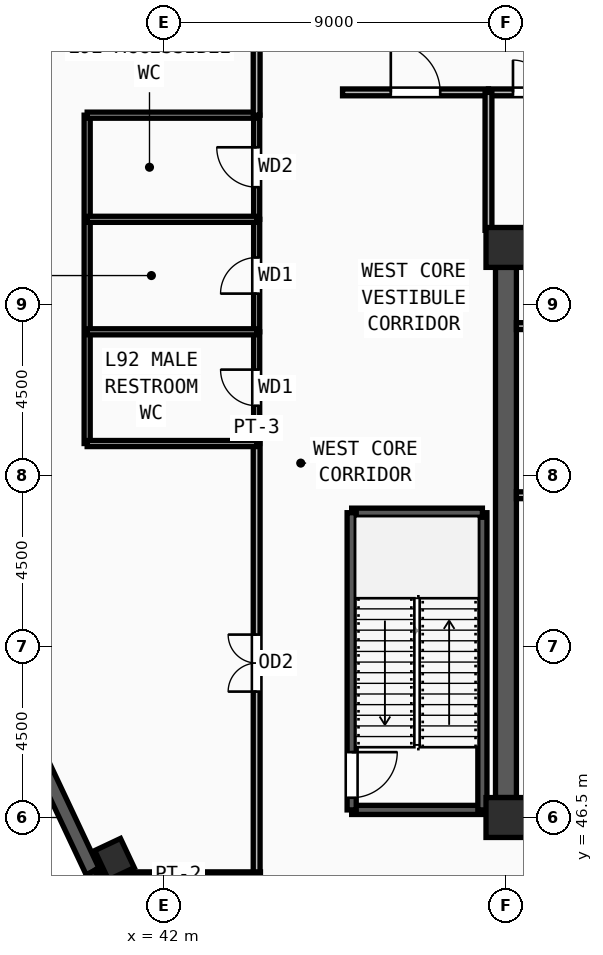
"""IFC4 building model, lengths in metres.
Left out: names, types, materials, properties, quantities, classifications, styles, units other than length and angle.
Written with IfcOpenShell. Run it as: python <this file> out.ifc"""

import sys

from ifc_helpers import new_model, si_unit, direction, frame, frame_2d, origin, origin_2d, place, context, subcontext, project, spatial, rectangle, extrude, source, transform, mapped, element, fill, save


model = new_model("IFC4")
c1 = context("Model", 3, precision=1e-05, world=origin(), true_north=direction((0.0, 1.0)))
c2 = subcontext(c1, "Body", "Model", "MODEL_VIEW")
j1 = project(units=[si_unit("LENGTHUNIT", "METRE"), si_unit("PLANEANGLEUNIT", "RADIAN")], contexts=[c1])
p1 = place(None, origin())
s1 = spatial("IfcSite", under=j1, at=p1, CompositionType="ELEMENT")
p2 = place(p1, origin())
s2 = spatial("IfcBuilding", under=s1, at=p2, CompositionType="ELEMENT")
p3 = place(p2, frame((0.0, 0.0, 355.8)))
s3 = spatial("IfcBuildingStorey", under=s2, at=p3, CompositionType="ELEMENT", Elevation=355.8)
m1 = source(origin(), c2, "Body", "SweptSolid", [
    extrude(rectangle(XDim=1.05, YDim=1.05, at=origin_2d()), origin(), (0.0, 0.0, 1.0), 4.8),
])
for number, where, z_axis, x_axis in (
    (1, (51.0, 46.5, 0.0), (0.0, 0.0, 1.0), (1.0, 0.0, 0.0)),
    (2, (51.0, 61.5, 0.0), (0.0, 0.0, 1.0), (1.0, 0.0, 0.0)),
):
    element("IfcColumn", number, at=place(p3, frame(where, z_axis=z_axis, x_axis=x_axis)), inside=s3, PredefinedType="COLUMN", context=c2, shape_type="MappedRepresentation", body=[
        mapped(m1, transform((0.0, 0.0, 0.0), x_axis=(1.0, 0.0, 0.0), y_axis=(0.0, 1.0, 0.0), z_axis=(0.0, 0.0, 1.0), scale=1.0)),
    ])
m2 = source(origin(), c2, "Body", "SweptSolid", [
    extrude(rectangle(XDim=0.85, YDim=0.75, at=origin_2d()), origin(), (0.0, 0.0, 1.0), 4.8),
])
p4 = place(p3, frame((40.699, 45.405, 0.0), z_axis=(0.0, 0.0, 1.0), x_axis=(-0.425937207192, 0.90475272618, 0.0)))
e3 = element("IfcColumn", 3, at=p4, inside=s3, PredefinedType="COLUMN", context=c2, shape_type="MappedRepresentation", body=[
    mapped(m2, transform((0.0, 0.0, 0.0), x_axis=(1.0, 0.0, 0.0), y_axis=(0.0, 1.0, 0.0), z_axis=(0.0, 0.0, 1.0), scale=1.0)),
])
p5 = place(p3, frame((30.621, 65.258, 0.0), z_axis=(0.0, 0.0, 1.0), x_axis=(0.426031057179, -0.904708537773, 0.0)))
e4 = element("IfcWall", 4, at=p5, inside=s3, PredefinedType="SOLIDWALL", context=c2, shape_type="SweptSolid", body=[
    extrude(rectangle(XDim=22.306, YDim=0.38, at=frame_2d((11.153, 0.0))), origin(), (0.0, 0.0, 1.0), 4.35),
])
m3 = source(origin(), c2, "Body", "SweptSolid", [
    extrude(rectangle(XDim=1.35, YDim=1.85, at=frame_2d((0.675, 0.925))), frame((0.0, 0.2, 0.0), z_axis=(0.0, -1.0, 0.0), x_axis=(1.0, 0.0, 0.0)), (0.0, 0.0, 1.0), 0.4),
])
p6 = place(p5, frame((10.478, 0.0, 0.55)))
e5 = element("IfcOpeningElement", 5, at=p6, cuts=e4, PredefinedType="OPENING", context=c2, shape_type="MappedRepresentation", body=[
    mapped(m3, transform((0.0, 0.0, 0.0), x_axis=(1.0, 0.0, 0.0), y_axis=(0.0, 1.0, 0.0), z_axis=(0.0, 0.0, 1.0), scale=1.0)),
])
p7 = place(p3, frame((40.124, 45.078, 0.0), z_axis=(0.0, 0.0, 1.0), x_axis=(0.559113952573, -0.829090820138, 0.0)))
e6 = element("IfcWall", 6, at=p7, inside=s3, PredefinedType="SOLIDWALL", context=c2, shape_type="SweptSolid", body=[
    extrude(rectangle(XDim=8.308, YDim=0.38, at=frame_2d((4.154, 0.0))), origin(), (0.0, 0.0, 1.0), 4.35),
])
p8 = place(p7, frame((3.479, 0.0, 0.55)))
e7 = element("IfcOpeningElement", 7, at=p8, cuts=e6, PredefinedType="OPENING", context=c2, shape_type="MappedRepresentation", body=[
    mapped(m3, transform((0.0, 0.0, 0.0), x_axis=(1.0, 0.0, 0.0), y_axis=(0.0, 1.0, 0.0), z_axis=(0.0, 0.0, 1.0), scale=1.0)),
])
p9 = place(p3, frame((51.0, 47.025, 0.0), z_axis=(0.0, 0.0, 1.0), x_axis=(0.0, 1.0, 0.0)))
e8 = element("IfcWall", 8, at=p9, inside=s3, PredefinedType="SHEAR", context=c2, shape_type="SweptSolid", body=[
    extrude(rectangle(XDim=13.95, YDim=0.55, at=frame_2d((6.975, 0.0))), origin(), (0.0, 0.0, 1.0), 4.35),
])
p10 = place(p3, frame((46.94, 46.7, 0.0), z_axis=(0.0, 0.0, 1.0), x_axis=(1.0, 0.0, 0.0)))
e9 = element("IfcWall", 9, at=p10, inside=s3, PredefinedType="SOLIDWALL", context=c2, shape_type="SweptSolid", body=[
    extrude(rectangle(XDim=3.44, YDim=0.24, at=frame_2d((1.72, 0.0))), origin(), (0.0, 0.0, 1.0), 4.35),
])
p11 = place(p3, frame((50.38, 46.7, 0.0), z_axis=(0.0, 0.0, 1.0), x_axis=(0.0, 1.0, 0.0)))
e10 = element("IfcWall", 10, at=p11, inside=s3, PredefinedType="SOLIDWALL", context=c2, shape_type="SweptSolid", body=[
    extrude(rectangle(XDim=7.82, YDim=0.24, at=frame_2d((3.91, 0.0))), origin(), (0.0, 0.0, 1.0), 4.35),
])
p12 = place(p3, frame((50.38, 54.52, 0.0), z_axis=(0.0, 0.0, 1.0), x_axis=(-1.0, 0.0, 0.0)))
e11 = element("IfcWall", 11, at=p12, inside=s3, PredefinedType="SOLIDWALL", context=c2, shape_type="SweptSolid", body=[
    extrude(rectangle(XDim=3.44, YDim=0.24, at=frame_2d((1.72, 0.0))), origin(), (0.0, 0.0, 1.0), 4.35),
])
p13 = place(p3, frame((46.94, 54.52, 0.0), z_axis=(0.0, 0.0, 1.0), x_axis=(0.0, -1.0, 0.0)))
e12 = element("IfcWall", 12, at=p13, inside=s3, PredefinedType="SOLIDWALL", context=c2, shape_type="SweptSolid", body=[
    extrude(rectangle(XDim=7.82, YDim=0.24, at=frame_2d((3.91, 0.0))), origin(), (0.0, 0.0, 1.0), 4.35),
])
m4 = source(origin(), c2, "Body", "SweptSolid", [
    extrude(rectangle(XDim=1.2, YDim=2.2, at=frame_2d((0.6, 1.1))), frame((0.0, 0.13, 0.0), z_axis=(0.0, -1.0, 0.0), x_axis=(1.0, 0.0, 0.0)), (0.0, 0.0, 1.0), 0.26),
])
p14 = place(p13, frame((6.3, 0.0, 0.0)))
e13 = element("IfcOpeningElement", 13, at=p14, cuts=e12, PredefinedType="OPENING", context=c2, shape_type="MappedRepresentation", body=[
    mapped(m4, transform((0.0, 0.0, 0.0), x_axis=(1.0, 0.0, 0.0), y_axis=(0.0, 1.0, 0.0), z_axis=(0.0, 0.0, 1.0), scale=1.0)),
])
p15 = place(p3, frame((51.275, 54.98, 0.0), z_axis=(0.0, 0.0, 1.0), x_axis=(1.0, 0.0, 0.0)))
e14 = element("IfcWall", 14, at=p15, inside=s3, PredefinedType="PARTITIONING", context=c2, shape_type="SweptSolid", body=[
    extrude(rectangle(XDim=2.485, YDim=0.18, at=frame_2d((1.243, 0.0))), origin(), (0.0, 0.0, 1.0), 4.35),
])
m5 = source(origin(), c2, "Body", "SweptSolid", [
    extrude(rectangle(XDim=0.85, YDim=2.1, at=frame_2d((0.425, 1.05))), frame((0.0, 0.1, 0.0), z_axis=(0.0, -1.0, 0.0), x_axis=(1.0, 0.0, 0.0)), (0.0, 0.0, 1.0), 0.2),
])
p16 = place(p15, frame((0.915, 0.0, 0.0)))
e15 = element("IfcOpeningElement", 15, at=p16, cuts=e14, PredefinedType="OPENING", context=c2, shape_type="MappedRepresentation", body=[
    mapped(m5, transform((0.0, 0.0, 0.0), x_axis=(1.0, 0.0, 0.0), y_axis=(0.0, 1.0, 0.0), z_axis=(0.0, 0.0, 1.0), scale=1.0)),
])
p17 = place(p3, frame((44.44, 56.34, 0.0), z_axis=(0.0, 0.0, 1.0), x_axis=(0.0, 1.0, 0.0)))
e16 = element("IfcWall", 16, at=p17, inside=s3, PredefinedType="PARTITIONING", context=c2, shape_type="SweptSolid", body=[
    extrude(rectangle(XDim=2.94, YDim=0.16, at=frame_2d((1.47, 0.0))), origin(), (0.0, 0.0, 1.0), 4.35),
])
m6 = source(origin(), c2, "Body", "SweptSolid", [
    extrude(rectangle(XDim=0.95, YDim=2.15, at=frame_2d((0.475, 1.075))), frame((0.0, 0.09, 0.0), z_axis=(0.0, -1.0, 0.0), x_axis=(1.0, 0.0, 0.0)), (0.0, 0.0, 1.0), 0.18),
])
p18 = place(p17, frame((0.995, 0.0, 0.0)))
e17 = element("IfcOpeningElement", 17, at=p18, cuts=e16, PredefinedType="OPENING", context=c2, shape_type="MappedRepresentation", body=[
    mapped(m6, transform((0.0, 0.0, 0.0), x_axis=(1.0, 0.0, 0.0), y_axis=(0.0, 1.0, 0.0), z_axis=(0.0, 0.0, 1.0), scale=1.0)),
])
p19 = place(p3, frame((44.44, 59.28, 0.0), z_axis=(0.0, 0.0, 1.0), x_axis=(0.0, 1.0, 0.0)))
e18 = element("IfcWall", 18, at=p19, inside=s3, PredefinedType="PARTITIONING", context=c2, shape_type="SweptSolid", body=[
    extrude(rectangle(XDim=2.96, YDim=0.16, at=frame_2d((1.48, 0.0))), origin(), (0.0, 0.0, 1.0), 4.35),
])
p20 = place(p19, frame((1.005, 0.0, 0.0)))
e19 = element("IfcOpeningElement", 19, at=p20, cuts=e18, PredefinedType="OPENING", context=c2, shape_type="MappedRepresentation", body=[
    mapped(m6, transform((0.0, 0.0, 0.0), x_axis=(1.0, 0.0, 0.0), y_axis=(0.0, 1.0, 0.0), z_axis=(0.0, 0.0, 1.0), scale=1.0)),
])
p21 = place(p3, frame((44.44, 62.24, 0.0), z_axis=(0.0, 0.0, 1.0), x_axis=(0.0, 1.0, 0.0)))
e20 = element("IfcWall", 20, at=p21, inside=s3, PredefinedType="PARTITIONING", context=c2, shape_type="SweptSolid", body=[
    extrude(rectangle(XDim=2.74, YDim=0.16, at=frame_2d((1.37, 0.0))), origin(), (0.0, 0.0, 1.0), 4.35),
])
m7 = source(origin(), c2, "Body", "SweptSolid", [
    extrude(rectangle(XDim=1.05, YDim=2.15, at=frame_2d((0.525, 1.075))), frame((0.0, 0.09, 0.0), z_axis=(0.0, -1.0, 0.0), x_axis=(1.0, 0.0, 0.0)), (0.0, 0.0, 1.0), 0.18),
])
p22 = place(p21, frame((0.845, 0.0, 0.0)))
e21 = element("IfcOpeningElement", 21, at=p22, cuts=e20, PredefinedType="OPENING", context=c2, shape_type="MappedRepresentation", body=[
    mapped(m7, transform((0.0, 0.0, 0.0), x_axis=(1.0, 0.0, 0.0), y_axis=(0.0, 1.0, 0.0), z_axis=(0.0, 0.0, 1.0), scale=1.0)),
])
p23 = place(p3, frame((50.54, 65.58, 0.0), z_axis=(0.0, 0.0, 1.0), x_axis=(1.0, 0.0, 0.0)))
e22 = element("IfcWall", 22, at=p23, inside=s3, PredefinedType="PARTITIONING", context=c2, shape_type="SweptSolid", body=[
    extrude(rectangle(XDim=2.14, YDim=0.18, at=frame_2d((1.07, 0.0))), origin(), (0.0, 0.0, 1.0), 4.35),
])
p24 = place(p23, frame((0.645, 0.0, 0.0)))
e23 = element("IfcOpeningElement", 23, at=p24, cuts=e22, PredefinedType="OPENING", context=c2, shape_type="MappedRepresentation", body=[
    mapped(m5, transform((0.0, 0.0, 0.0), x_axis=(1.0, 0.0, 0.0), y_axis=(0.0, 1.0, 0.0), z_axis=(0.0, 0.0, 1.0), scale=1.0)),
])
p25 = place(p3, frame((46.7, 65.58, 0.0), z_axis=(0.0, 0.0, 1.0), x_axis=(1.0, 0.0, 0.0)))
e24 = element("IfcWall", 24, at=p25, inside=s3, PredefinedType="PARTITIONING", context=c2, shape_type="SweptSolid", body=[
    extrude(rectangle(XDim=3.84, YDim=0.18, at=frame_2d((1.92, 0.0))), origin(), (0.0, 0.0, 1.0), 4.35),
])
m8 = source(origin(), c2, "Body", "SweptSolid", [
    extrude(rectangle(XDim=1.3, YDim=2.2, at=frame_2d((0.65, 1.1))), frame((0.0, 0.1, 0.0), z_axis=(0.0, -1.0, 0.0), x_axis=(1.0, 0.0, 0.0)), (0.0, 0.0, 1.0), 0.2),
])
p26 = place(p25, frame((1.27, 0.0, 0.0)))
e25 = element("IfcOpeningElement", 25, at=p26, cuts=e24, PredefinedType="OPENING", context=c2, shape_type="MappedRepresentation", body=[
    mapped(m8, transform((0.0, 0.0, 0.0), x_axis=(1.0, 0.0, 0.0), y_axis=(0.0, 1.0, 0.0), z_axis=(0.0, 0.0, 1.0), scale=1.0)),
])
p27 = place(p3, frame((44.44, 44.785, 0.0), z_axis=(0.0, 0.0, 1.0), x_axis=(0.0, 1.0, 0.0)))
e26 = element("IfcWall", 26, at=p27, inside=s3, PredefinedType="PARTITIONING", context=c2, shape_type="SweptSolid", body=[
    extrude(rectangle(XDim=11.555, YDim=0.18, at=frame_2d((5.778, 0.0))), origin(), (0.0, 0.0, 1.0), 3.985),
])
m9 = source(origin(), c2, "Body", "SweptSolid", [
    extrude(rectangle(XDim=1.5, YDim=2.2, at=frame_2d((0.75, 1.1))), frame((0.0, 0.1, 0.0), z_axis=(0.0, -1.0, 0.0), x_axis=(1.0, 0.0, 0.0)), (0.0, 0.0, 1.0), 0.2),
])
p28 = place(p27, frame((5.028, 0.0, 0.0)))
e27 = element("IfcOpeningElement", 27, at=p28, cuts=e26, PredefinedType="OPENING", context=c2, shape_type="MappedRepresentation", body=[
    mapped(m9, transform((0.0, 0.0, 0.0), x_axis=(1.0, 0.0, 0.0), y_axis=(0.0, 1.0, 0.0), z_axis=(0.0, 0.0, 1.0), scale=1.0)),
])
p29 = place(p3, frame((51.275, 59.43, 0.0), z_axis=(0.0, 0.0, 1.0), x_axis=(1.0, 0.0, 0.0)))
e28 = element("IfcWall", 28, at=p29, inside=s3, PredefinedType="PARTITIONING", context=c2, shape_type="SweptSolid", body=[
    extrude(rectangle(XDim=2.505, YDim=0.18, at=frame_2d((1.252, 0.0))), origin(), (0.0, 0.0, 1.0), 4.35),
])
p30 = place(p3, frame((39.98, 56.34, 0.0), z_axis=(0.0, 0.0, 1.0), x_axis=(0.0, 1.0, 0.0)))
e29 = element("IfcWall", 29, at=p30, inside=s3, PredefinedType="PARTITIONING", context=c2, shape_type="SweptSolid", body=[
    extrude(rectangle(XDim=8.64, YDim=0.16, at=frame_2d((4.32, 0.0))), origin(), (0.0, 0.0, 1.0), 4.35),
])
for number, where, z_axis, x_axis in (
    (30, (39.98, 56.34, 0.0), (0.0, 0.0, 1.0), (1.0, 0.0, 0.0)),
    (31, (39.98, 59.28, 0.0), (0.0, 0.0, 1.0), (1.0, 0.0, 0.0)),
    (32, (39.98, 62.24, 0.0), (0.0, 0.0, 1.0), (1.0, 0.0, 0.0)),
    (33, (39.98, 64.98, 0.0), (0.0, 0.0, 1.0), (1.0, 0.0, 0.0)),
):
    element("IfcWall", number, at=place(p3, frame(where, z_axis=z_axis, x_axis=x_axis)), inside=s3, PredefinedType="PARTITIONING", context=c2, shape_type="SweptSolid", body=[
        extrude(rectangle(XDim=4.46, YDim=0.16, at=frame_2d((2.23, 0.0))), origin(), (0.0, 0.0, 1.0), 4.35),
    ])
p31 = place(p3, frame((50.54, 61.95, 0.0), z_axis=(0.0, 0.0, 1.0), x_axis=(0.0, 1.0, 0.0)))
e34 = element("IfcWall", 34, at=p31, inside=s3, PredefinedType="PARTITIONING", context=c2, shape_type="SweptSolid", body=[
    extrude(rectangle(XDim=3.63, YDim=0.18, at=frame_2d((1.815, 0.0))), origin(), (0.0, 0.0, 1.0), 4.35),
])
p32 = place(p3, frame((44.44, 64.98, 0.0), z_axis=(0.0, 0.0, 1.0), x_axis=(0.0, 1.0, 0.0)))
e35 = element("IfcWall", 35, at=p32, inside=s3, PredefinedType="PARTITIONING", context=c2, shape_type="SweptSolid", body=[
    extrude(rectangle(XDim=3.0, YDim=0.18, at=frame_2d((1.5, 0.0))), origin(), (0.0, 0.0, 1.0), 4.35),
])
p33 = place(p3, frame((44.54, 45.0, 0.0), z_axis=(0.0, 0.0, 1.0), x_axis=(-1.0, 0.0, 0.0)))
e36 = element("IfcWall", 36, at=p33, inside=s3, PredefinedType="PARTITIONING", context=c2, shape_type="SweptSolid", body=[
    extrude(rectangle(XDim=4.327, YDim=0.14, at=frame_2d((2.164, 0.0))), origin(), (0.0, 0.0, 1.0), 4.35),
])
m10 = source(origin(), c2, "Body", "SweptSolid", [
    extrude(rectangle(XDim=1.2, YDim=2.2, at=frame_2d((0.6, 1.1))), frame((0.0, 0.025, 0.0), z_axis=(0.0, -1.0, 0.0), x_axis=(1.0, 0.0, 0.0)), (0.0, 0.0, 1.0), 0.05),
])
p34 = place(p14, origin())
e37 = element("IfcDoor", 37, at=p34, inside=s3, OperationType="SINGLE_SWING_LEFT", PredefinedType="DOOR", context=c2, shape_type="MappedRepresentation", body=[
    mapped(m10, transform((0.0, 0.0, 0.0), x_axis=(1.0, 0.0, 0.0), y_axis=(0.0, 1.0, 0.0), z_axis=(0.0, 0.0, 1.0), scale=1.0)),
])
fill(e13, e37)
m11 = source(origin(), c2, "Body", "SweptSolid", [
    extrude(rectangle(XDim=0.95, YDim=2.15, at=frame_2d((0.475, 1.075))), frame((0.0, 0.025, 0.0), z_axis=(0.0, -1.0, 0.0), x_axis=(1.0, 0.0, 0.0)), (0.0, 0.0, 1.0), 0.05),
])
p35 = place(p18, origin())
e38 = element("IfcDoor", 38, at=p35, inside=s3, OperationType="SINGLE_SWING_RIGHT", PredefinedType="DOOR", context=c2, shape_type="MappedRepresentation", body=[
    mapped(m11, transform((0.0, 0.0, 0.0), x_axis=(1.0, 0.0, 0.0), y_axis=(0.0, 1.0, 0.0), z_axis=(0.0, 0.0, 1.0), scale=1.0)),
])
fill(e17, e38)
p36 = place(p20, origin())
e39 = element("IfcDoor", 39, at=p36, inside=s3, OperationType="SINGLE_SWING_LEFT", PredefinedType="DOOR", context=c2, shape_type="MappedRepresentation", body=[
    mapped(m11, transform((0.0, 0.0, 0.0), x_axis=(1.0, 0.0, 0.0), y_axis=(0.0, 1.0, 0.0), z_axis=(0.0, 0.0, 1.0), scale=1.0)),
])
fill(e19, e39)
m12 = source(origin(), c2, "Body", "SweptSolid", [
    extrude(rectangle(XDim=1.05, YDim=2.15, at=frame_2d((0.525, 1.075))), frame((0.0, 0.025, 0.0), z_axis=(0.0, -1.0, 0.0), x_axis=(1.0, 0.0, 0.0)), (0.0, 0.0, 1.0), 0.05),
])
p37 = place(p22, origin())
e40 = element("IfcDoor", 40, at=p37, inside=s3, OperationType="SINGLE_SWING_RIGHT", PredefinedType="DOOR", context=c2, shape_type="MappedRepresentation", body=[
    mapped(m12, transform((0.0, 0.0, 0.0), x_axis=(1.0, 0.0, 0.0), y_axis=(0.0, 1.0, 0.0), z_axis=(0.0, 0.0, 1.0), scale=1.0)),
])
fill(e21, e40)
m13 = source(origin(), c2, "Body", "SweptSolid", [
    extrude(rectangle(XDim=0.85, YDim=2.1, at=frame_2d((0.425, 1.05))), frame((0.0, 0.025, 0.0), z_axis=(0.0, -1.0, 0.0), x_axis=(1.0, 0.0, 0.0)), (0.0, 0.0, 1.0), 0.05),
])
p38 = place(p24, origin())
e41 = element("IfcDoor", 41, at=p38, inside=s3, OperationType="SINGLE_SWING_LEFT", PredefinedType="DOOR", context=c2, shape_type="MappedRepresentation", body=[
    mapped(m13, transform((0.0, 0.0, 0.0), x_axis=(1.0, 0.0, 0.0), y_axis=(0.0, 1.0, 0.0), z_axis=(0.0, 0.0, 1.0), scale=1.0)),
])
fill(e23, e41)
m14 = source(origin(), c2, "Body", "SweptSolid", [
    extrude(rectangle(XDim=1.3, YDim=2.2, at=frame_2d((0.65, 1.1))), frame((0.0, 0.025, 0.0), z_axis=(0.0, -1.0, 0.0), x_axis=(1.0, 0.0, 0.0)), (0.0, 0.0, 1.0), 0.05),
])
p39 = place(p26, origin())
e42 = element("IfcDoor", 42, at=p39, inside=s3, OperationType="SINGLE_SWING_LEFT", PredefinedType="DOOR", context=c2, shape_type="MappedRepresentation", body=[
    mapped(m14, transform((0.0, 0.0, 0.0), x_axis=(1.0, 0.0, 0.0), y_axis=(0.0, 1.0, 0.0), z_axis=(0.0, 0.0, 1.0), scale=1.0)),
])
fill(e25, e42)
m15 = source(origin(), c2, "Body", "SweptSolid", [
    extrude(rectangle(XDim=1.5, YDim=2.2, at=frame_2d((0.75, 1.1))), frame((0.0, 0.025, 0.0), z_axis=(0.0, -1.0, 0.0), x_axis=(1.0, 0.0, 0.0)), (0.0, 0.0, 1.0), 0.05),
])
p40 = place(p28, origin())
e43 = element("IfcDoor", 43, at=p40, inside=s3, OperationType="DOUBLE_DOOR_SINGLE_SWING", PredefinedType="DOOR", context=c2, shape_type="MappedRepresentation", body=[
    mapped(m15, transform((0.0, 0.0, 0.0), x_axis=(1.0, 0.0, 0.0), y_axis=(0.0, 1.0, 0.0), z_axis=(0.0, 0.0, 1.0), scale=1.0)),
])
fill(e27, e43)
save(model, sys.argv[1])
